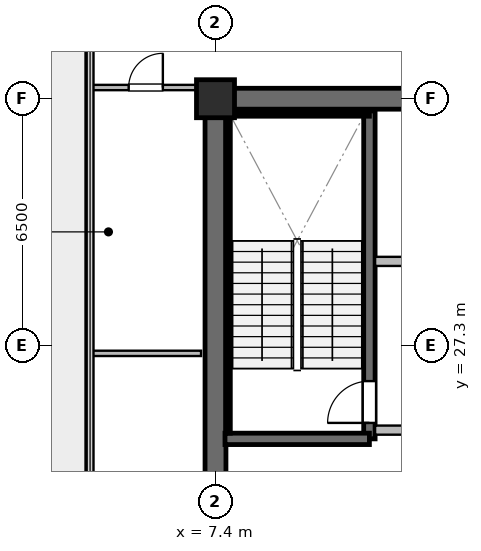
"""IFC4 building model, lengths in metres.
Left out: names, types, materials, properties, quantities, classifications, styles, units other than length and angle.
Written with IfcOpenShell. Run it as: python <this file> out.ifc"""

import sys

from ifc_helpers import new_model, si_unit, direction, frame, frame_2d, origin, origin_2d, place, context, subcontext, project, spatial, rectangle, extrude, source, transform, mapped, element, fill, save


model = new_model("IFC4")
c1 = context("Model", 3, precision=1e-05, world=origin(), true_north=direction((0.0, 1.0)))
c2 = subcontext(c1, "Body", "Model", "MODEL_VIEW")
j1 = project(units=[si_unit("LENGTHUNIT", "METRE"), si_unit("PLANEANGLEUNIT", "RADIAN")], contexts=[c1])
p1 = place(None, origin())
s1 = spatial("IfcSite", under=j1, at=p1, CompositionType="ELEMENT")
p2 = place(p1, origin())
s2 = spatial("IfcBuilding", under=s1, at=p2, CompositionType="ELEMENT")
p3 = place(p2, frame((0.0, 0.0, 196.6)))
s3 = spatial("IfcBuildingStorey", under=s2, at=p3, CompositionType="ELEMENT", Elevation=196.6)
p4 = place(p3, frame((7.125, 33.8, 0.0), z_axis=(0.0, 0.0, 1.0), x_axis=(1.0, 0.0, 0.0)))
e1 = element("IfcWall", 1, at=p4, inside=s3, PredefinedType="SHEAR", context=c2, shape_type="SweptSolid", body=[
    extrude(rectangle(XDim=15.35, YDim=0.55, at=frame_2d((7.675, 0.0))), origin(), (0.0, 0.0, 1.0), 4.5),
])
p5 = place(p4, frame((8.325, 0.0, 0.0)))
e2 = element("IfcOpeningElement", 2, at=p5, cuts=e1, PredefinedType="OPENING", context=c2, shape_type="SweptSolid", body=[
    extrude(rectangle(XDim=0.95, YDim=2.15, at=frame_2d((0.475, 1.075))), frame((0.0, 0.285, 0.0), z_axis=(0.0, -1.0, 0.0), x_axis=(1.0, 0.0, 0.0)), (0.0, 0.0, 1.0), 0.57),
])
p6 = place(p4, frame((11.865, 0.0, 0.0)))
e3 = element("IfcOpeningElement", 3, at=p6, cuts=e1, PredefinedType="OPENING", context=c2, shape_type="SweptSolid", body=[
    extrude(rectangle(XDim=0.95, YDim=2.15, at=frame_2d((0.475, 1.075))), frame((0.0, 0.285, 0.0), z_axis=(0.0, -1.0, 0.0), x_axis=(1.0, 0.0, 0.0)), (0.0, 0.0, 1.0), 0.57),
])
p7 = place(p3, frame((7.4, 15.075, 0.0), z_axis=(0.0, 0.0, 1.0), x_axis=(0.0, 1.0, 0.0)))
e4 = element("IfcWall", 4, at=p7, inside=s3, PredefinedType="SHEAR", context=c2, shape_type="SweptSolid", body=[
    extrude(rectangle(XDim=18.45, YDim=0.55, at=frame_2d((9.225, 0.0))), origin(), (0.0, 0.0, 1.0), 4.5),
])
p8 = place(p3, frame((11.45, 24.85, 0.0), z_axis=(0.0, 0.0, 1.0), x_axis=(0.0, 1.0, 0.0)))
e5 = element("IfcWall", 5, at=p8, inside=s3, PredefinedType="SHEAR", context=c2, shape_type="SweptSolid", body=[
    extrude(rectangle(XDim=8.63, YDim=0.3, at=frame_2d((4.315, 0.0))), origin(), (0.0, 0.0, 1.0), 4.5),
])
p9 = place(p8, frame((0.42, 0.0, 0.0)))
e6 = element("IfcOpeningElement", 6, at=p9, cuts=e5, PredefinedType="OPENING", context=c2, shape_type="SweptSolid", body=[
    extrude(rectangle(XDim=1.1, YDim=2.15, at=frame_2d((0.55, 1.075))), frame((0.0, 0.16, 0.0), z_axis=(0.0, -1.0, 0.0), x_axis=(1.0, 0.0, 0.0)), (0.0, 0.0, 1.0), 0.32),
])
p10 = place(p3, frame((7.65, 24.85, 0.0), z_axis=(0.0, 0.0, 1.0), x_axis=(1.0, 0.0, 0.0)))
e7 = element("IfcWall", 7, at=p10, inside=s3, PredefinedType="SHEAR", context=c2, shape_type="SweptSolid", body=[
    extrude(rectangle(XDim=3.8, YDim=0.3, at=frame_2d((1.9, 0.0))), origin(), (0.0, 0.0, 1.0), 4.5),
])
p11 = place(p3, frame((7.73, 33.4, 0.0), z_axis=(0.0, 0.0, 1.0), x_axis=(1.0, 0.0, 0.0)))
e8 = element("IfcWall", 8, at=p11, inside=s3, PredefinedType="SOLIDWALL", context=c2, shape_type="SweptSolid", body=[
    extrude(rectangle(XDim=3.72, YDim=0.12, at=frame_2d((1.86, 0.0))), origin(), (0.0, 0.0, 1.0), 4.5),
])
p12 = place(p3, frame((7.73, 25.0, 0.0), z_axis=(0.0, 0.0, 1.0), x_axis=(0.0, 1.0, 0.0)))
e9 = element("IfcWall", 9, at=p12, inside=s3, PredefinedType="SOLIDWALL", context=c2, shape_type="SweptSolid", body=[
    extrude(rectangle(XDim=8.32, YDim=0.12, at=frame_2d((4.16, 0.0))), origin(), (0.0, 0.0, 1.0), 4.5),
])
m1 = source(origin(), c2, "Body", "SweptSolid", [
    extrude(rectangle(XDim=1.0, YDim=1.0, at=origin_2d()), origin(), (0.0, 0.0, 1.0), 4.8),
])
p13 = place(p3, frame((7.4, 33.8, 0.0), z_axis=(0.0, 0.0, 1.0), x_axis=(1.0, 0.0, 0.0)))
e10 = element("IfcColumn", 10, at=p13, inside=s3, PredefinedType="COLUMN", context=c2, shape_type="MappedRepresentation", body=[
    mapped(m1, transform((0.0, 0.0, 0.0), scale=1.0)),
])
p14 = place(p3, frame((11.6, 25.08, 0.0), z_axis=(0.0, 0.0, 1.0), x_axis=(1.0, 0.0, 0.0)))
e11 = element("IfcWall", 11, at=p14, inside=s3, PredefinedType="SOLIDWALL", context=c2, shape_type="SweptSolid", body=[
    extrude(rectangle(XDim=6.92, YDim=0.24, at=frame_2d((3.46, 0.0))), origin(), (0.0, 0.0, 1.0), 3.897),
])
p15 = place(p14, frame((2.6, 0.0, 0.0)))
e12 = element("IfcOpeningElement", 12, at=p15, cuts=e11, PredefinedType="OPENING", context=c2, shape_type="SweptSolid", body=[
    extrude(rectangle(XDim=1.2, YDim=2.16, at=frame_2d((0.6, 1.08))), frame((0.0, 0.13, 0.0), z_axis=(0.0, -1.0, 0.0), x_axis=(1.0, 0.0, 0.0)), (0.0, 0.0, 1.0), 0.26),
])
p16 = place(p3, frame((11.6, 29.52, 0.0), z_axis=(0.0, 0.0, 1.0), x_axis=(1.0, 0.0, 0.0)))
e13 = element("IfcWall", 13, at=p16, inside=s3, PredefinedType="SOLIDWALL", context=c2, shape_type="SweptSolid", body=[
    extrude(rectangle(XDim=6.92, YDim=0.24, at=frame_2d((3.46, 0.0))), origin(), (0.0, 0.0, 1.0), 3.897),
])
p17 = place(p3, frame((4.11, 27.1, 0.0), z_axis=(0.0, 0.0, 1.0), x_axis=(1.0, 0.0, 0.0)))
e14 = element("IfcWall", 14, at=p17, inside=s3, PredefinedType="PARTITIONING", context=c2, shape_type="SweptSolid", body=[
    extrude(rectangle(XDim=2.91, YDim=0.14, at=frame_2d((1.455, 0.0))), origin(), (0.0, 0.0, 1.0), 4.5),
])
p18 = place(p3, frame((4.11, 34.095, 0.0), z_axis=(0.0, 0.0, 1.0), x_axis=(1.0, 0.0, 0.0)))
e15 = element("IfcWall", 15, at=p18, inside=s3, PredefinedType="PARTITIONING", context=c2, shape_type="SweptSolid", body=[
    extrude(rectangle(XDim=2.91, YDim=0.14, at=frame_2d((1.455, 0.0))), origin(), (0.0, 0.0, 1.0), 4.5),
])
p19 = place(p18, frame((1.005, 0.0, 0.0)))
e16 = element("IfcOpeningElement", 16, at=p19, cuts=e15, PredefinedType="OPENING", context=c2, shape_type="SweptSolid", body=[
    extrude(rectangle(XDim=0.9, YDim=2.1, at=frame_2d((0.45, 1.05))), frame((0.0, 0.08, 0.0), z_axis=(0.0, -1.0, 0.0), x_axis=(1.0, 0.0, 0.0)), (0.0, 0.0, 1.0), 0.16),
])
m2 = source(origin(), c2, "Body", "SweptSolid", [
    extrude(rectangle(XDim=1.1, YDim=2.15, at=frame_2d((0.55, 1.075))), frame((0.0, 0.025, 0.0), z_axis=(0.0, -1.0, 0.0), x_axis=(1.0, 0.0, 0.0)), (0.0, 0.0, 1.0), 0.05),
])
p20 = place(p9, origin())
e17 = element("IfcDoor", 17, at=p20, inside=s3, OperationType="SINGLE_SWING_LEFT", PredefinedType="DOOR", context=c2, shape_type="MappedRepresentation", body=[
    mapped(m2, transform((0.0, 0.0, 0.0), scale=1.0)),
])
fill(e6, e17)
m3 = source(origin(), c2, "Body", "SweptSolid", [
    extrude(rectangle(XDim=0.9, YDim=2.1, at=frame_2d((0.45, 1.05))), frame((0.0, 0.025, 0.0), z_axis=(0.0, -1.0, 0.0), x_axis=(1.0, 0.0, 0.0)), (0.0, 0.0, 1.0), 0.05),
])
p21 = place(p19, origin())
e18 = element("IfcDoor", 18, at=p21, inside=s3, OperationType="SINGLE_SWING_RIGHT", PredefinedType="DOOR", context=c2, shape_type="MappedRepresentation", body=[
    mapped(m3, transform((0.0, 0.0, 0.0), scale=1.0)),
])
fill(e16, e18)
save(model, sys.argv[1])
